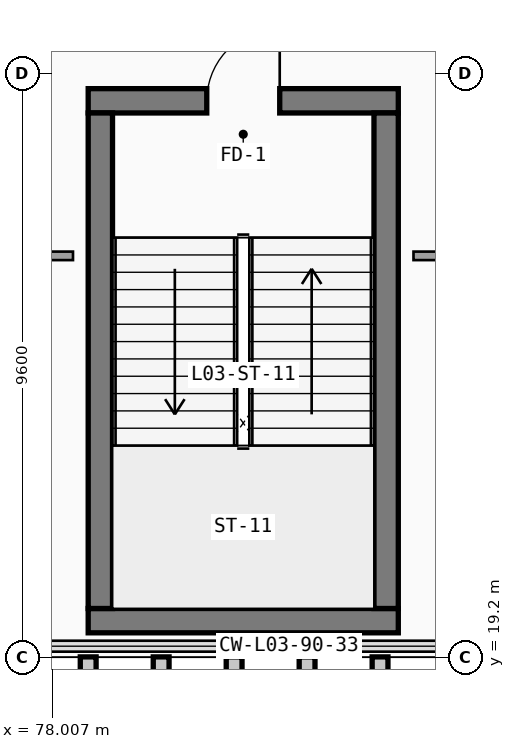
"""IFC4 building model, lengths in metres.
Left out: names, types, materials, properties, quantities, classifications, styles, units other than length and angle.
Written with IfcOpenShell. Run it as: python <this file> out.ifc"""

import sys

from ifc_helpers import new_model, si_unit, direction, frame, frame_2d, origin, place, context, subcontext, project, spatial, rectangle, extrude, element, fill, save


model = new_model("IFC4")
c1 = context("Model", 3, precision=1e-05, world=origin(), true_north=direction((0.0, 1.0)))
c2 = subcontext(c1, "Body", "Model", "MODEL_VIEW")
j1 = project(units=[si_unit("LENGTHUNIT", "METRE"), si_unit("PLANEANGLEUNIT", "RADIAN")], contexts=[c1])
p1 = place(None, origin())
s1 = spatial("IfcSite", under=j1, at=p1, CompositionType="ELEMENT")
p2 = place(p1, origin())
s2 = spatial("IfcBuilding", under=s1, at=p2, CompositionType="ELEMENT")
p3 = place(p2, frame((0.0, 0.0, 14.1)))
s3 = spatial("IfcBuildingStorey", under=s2, at=p3, CompositionType="ELEMENT", Elevation=14.1)
p4 = place(p3, frame((78.6, 19.8, 0.0), z_axis=(0.0, 0.0, 1.0), x_axis=(1.0, 0.0, 0.0)))
e1 = element("IfcWall", 1, at=p4, inside=s3, PredefinedType="SHEAR", context=c2, shape_type="SweptSolid", body=[
    extrude(rectangle(XDim=5.1, YDim=0.4, at=frame_2d((2.55, 0.0))), origin(), (0.0, 0.0, 1.0), 4.24),
])
p5 = place(p3, frame((83.7, 28.35, 0.0), z_axis=(0.0, 0.0, 1.0), x_axis=(-1.0, 0.0, 0.0)))
e2 = element("IfcWall", 2, at=p5, inside=s3, PredefinedType="SHEAR", context=c2, shape_type="SweptSolid", body=[
    extrude(rectangle(XDim=5.1, YDim=0.4, at=frame_2d((2.55, 0.0))), origin(), (0.0, 0.0, 1.0), 4.24),
])
p6 = place(p5, frame((3.15, 0.0, 0.0), z_axis=(0.0, 0.0, 1.0), x_axis=(-1.0, 0.0, 0.0)))
e3 = element("IfcOpeningElement", 3, at=p6, cuts=e2, PredefinedType="OPENING", context=c2, shape_type="SweptSolid", body=[
    extrude(rectangle(XDim=1.2, YDim=2.2, at=frame_2d((0.6, 1.1))), frame((0.0, 0.21, 0.0), z_axis=(0.0, -1.0, 0.0), x_axis=(1.0, 0.0, 0.0)), (0.0, 0.0, 1.0), 0.42),
])
for number, where, z_axis, x_axis in (
    (4, (78.8, 28.15, 0.0), (0.0, 0.0, 1.0), (0.0, -1.0, 0.0)),
    (5, (83.5, 20.0, 0.0), (0.0, 0.0, 1.0), (0.0, 1.0, 0.0)),
):
    element("IfcWall", number, at=place(p3, frame(where, z_axis=z_axis, x_axis=x_axis)), inside=s3, PredefinedType="SHEAR", context=c2, shape_type="SweptSolid", body=[
        extrude(rectangle(XDim=8.15, YDim=0.4, at=frame_2d((4.075, 0.0))), origin(), (0.0, 0.0, 1.0), 4.24),
    ])
p7 = place(p3, frame((87.62, 25.8, 0.0), z_axis=(0.0, 0.0, 1.0), x_axis=(-1.0, 0.0, 0.0)))
e6 = element("IfcWall", 6, at=p7, inside=s3, PredefinedType="PARTITIONING", context=c2, shape_type="SweptSolid", body=[
    extrude(rectangle(XDim=3.67, YDim=0.14, at=frame_2d((1.835, 0.0))), origin(), (0.0, 0.0, 1.0), 3.638),
])
p8 = place(p3, frame((78.35, 25.8, 0.0), z_axis=(0.0, 0.0, 1.0), x_axis=(-1.0, 0.0, 0.0)))
e7 = element("IfcWall", 7, at=p8, inside=s3, PredefinedType="PARTITIONING", context=c2, shape_type="SweptSolid", body=[
    extrude(rectangle(XDim=2.35, YDim=0.14, at=frame_2d((1.175, 0.0))), origin(), (0.0, 0.0, 1.0), 3.638),
])
p9 = place(p6, origin())
e8 = element("IfcDoor", 8, at=p9, inside=s3, OperationType="SINGLE_SWING_RIGHT", PredefinedType="DOOR", context=c2, shape_type="SweptSolid", body=[
    extrude(rectangle(XDim=1.2, YDim=2.2, at=frame_2d((0.6, 1.1))), frame((0.0, 0.025, 0.0), z_axis=(0.0, -1.0, 0.0), x_axis=(1.0, 0.0, 0.0)), (0.0, 0.0, 1.0), 0.05),
])
fill(e3, e8)
save(model, sys.argv[1])
